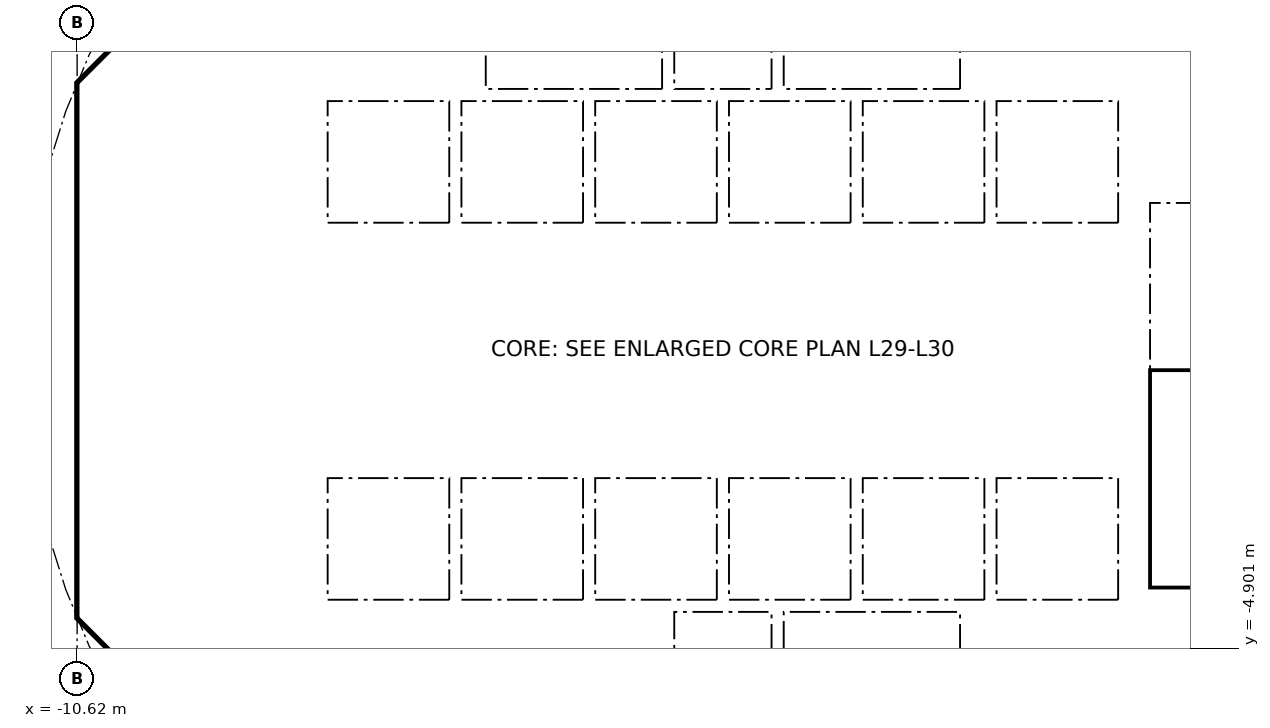
"""IFC4 building model, lengths in metres.
Left out: names, types, materials, properties, quantities, classifications, styles, units other than length and angle.
Written with IfcOpenShell. Run it as: python <this file> out.ifc"""

import sys

from ifc_helpers import new_model, si_unit, direction, frame, frame_2d, origin, place, context, subcontext, project, spatial, polyline, rectangle, outline, extrude, element, fill, save


model = new_model("IFC4")
c1 = context("Model", 3, precision=1e-05, world=origin(), true_north=direction((0.0, 1.0)))
c2 = subcontext(c1, "Body", "Model", "MODEL_VIEW")
j1 = project(units=[si_unit("LENGTHUNIT", "METRE"), si_unit("PLANEANGLEUNIT", "RADIAN")], contexts=[c1])
p1 = place(None, origin())
s1 = spatial("IfcSite", under=j1, at=p1, CompositionType="ELEMENT")
p2 = place(p1, origin())
s2 = spatial("IfcBuilding", under=s1, at=p2, CompositionType="ELEMENT")
p3 = place(p2, frame((0.0, 0.0, 123.3)))
s3 = spatial("IfcBuildingStorey", under=s2, at=p3, CompositionType="ELEMENT", Elevation=123.3)
p4 = place(p3, frame((9.988, 4.613, 0.0), z_axis=(0.0, 0.0, 1.0), x_axis=(-0.707106781187, 0.707106781187, 0.0)))
e1 = element("IfcWall", 1, at=p4, inside=s3, PredefinedType="SHEAR", context=c2, shape_type="SweptSolid", body=[
    extrude(rectangle(XDim=7.602, YDim=0.6, at=frame_2d((3.801, 0.0))), origin(), (0.0, 0.0, 1.0), 3.44),
])
p5 = place(p4, frame((3.201, 0.0, 0.0)))
e2 = element("IfcOpeningElement", 2, at=p5, cuts=e1, PredefinedType="OPENING", context=c2, shape_type="SweptSolid", body=[
    extrude(rectangle(XDim=1.2, YDim=2.1, at=frame_2d((0.6, 1.05))), frame((0.0, 0.31, 0.0), z_axis=(0.0, -1.0, 0.0), x_axis=(1.0, 0.0, 0.0)), (0.0, 0.0, 1.0), 0.62),
])
p6 = place(p3, frame((-4.613, 9.988, 0.0), z_axis=(0.0, 0.0, 1.0), x_axis=(-0.707106781187, -0.707106781187, 0.0)))
e3 = element("IfcWall", 3, at=p6, inside=s3, PredefinedType="SHEAR", context=c2, shape_type="SweptSolid", body=[
    extrude(rectangle(XDim=7.602, YDim=0.6, at=frame_2d((3.801, 0.0))), origin(), (0.0, 0.0, 1.0), 3.44),
])
p7 = place(p6, frame((0.351, 0.0, 0.0)))
e4 = element("IfcOpeningElement", 4, at=p7, cuts=e3, PredefinedType="OPENING", context=c2, shape_type="SweptSolid", body=[
    extrude(rectangle(XDim=1.1, YDim=2.1, at=frame_2d((0.55, 1.05))), frame((0.0, 0.31, 0.0), z_axis=(0.0, -1.0, 0.0), x_axis=(1.0, 0.0, 0.0)), (0.0, 0.0, 1.0), 0.62),
])
p8 = place(p3, frame((-10.325, 3.801, 0.0), z_axis=(0.0, 0.0, 1.0), x_axis=(0.0, -1.0, 0.0)))
e5 = element("IfcWall", 5, at=p8, inside=s3, PredefinedType="SHEAR", context=c2, shape_type="SweptSolid", body=[
    extrude(rectangle(XDim=7.602, YDim=0.6, at=frame_2d((3.801, 0.0))), origin(), (0.0, 0.0, 1.0), 3.44),
])
p9 = place(p8, frame((0.651, 0.0, 0.0)))
e6 = element("IfcOpeningElement", 6, at=p9, cuts=e5, PredefinedType="OPENING", context=c2, shape_type="SweptSolid", body=[
    extrude(rectangle(XDim=1.5, YDim=2.1, at=frame_2d((0.75, 1.05))), frame((0.0, 0.31, 0.0), z_axis=(0.0, -1.0, 0.0), x_axis=(1.0, 0.0, 0.0)), (0.0, 0.0, 1.0), 0.62),
])
p10 = place(p8, frame((5.451, 0.0, 0.0)))
e7 = element("IfcOpeningElement", 7, at=p10, cuts=e5, PredefinedType="OPENING", context=c2, shape_type="SweptSolid", body=[
    extrude(rectangle(XDim=1.5, YDim=2.1, at=frame_2d((0.75, 1.05))), frame((0.0, 0.31, 0.0), z_axis=(0.0, -1.0, 0.0), x_axis=(1.0, 0.0, 0.0)), (0.0, 0.0, 1.0), 0.62),
])
p11 = place(p3, frame((-9.988, -4.613, 0.0), z_axis=(0.0, 0.0, 1.0), x_axis=(0.707106781187, -0.707106781187, 0.0)))
e8 = element("IfcWall", 8, at=p11, inside=s3, PredefinedType="SHEAR", context=c2, shape_type="SweptSolid", body=[
    extrude(rectangle(XDim=7.602, YDim=0.6, at=frame_2d((3.801, 0.0))), origin(), (0.0, 0.0, 1.0), 3.44),
])
p12 = place(p11, frame((6.151, 0.0, 0.0)))
e9 = element("IfcOpeningElement", 9, at=p12, cuts=e8, PredefinedType="OPENING", context=c2, shape_type="SweptSolid", body=[
    extrude(rectangle(XDim=1.1, YDim=2.1, at=frame_2d((0.55, 1.05))), frame((0.0, 0.31, 0.0), z_axis=(0.0, -1.0, 0.0), x_axis=(1.0, 0.0, 0.0)), (0.0, 0.0, 1.0), 0.62),
])
p13 = place(p3, frame((4.613, -9.988, 0.0), z_axis=(0.0, 0.0, 1.0), x_axis=(0.707106781187, 0.707106781187, 0.0)))
e10 = element("IfcWall", 10, at=p13, inside=s3, PredefinedType="SHEAR", context=c2, shape_type="SweptSolid", body=[
    extrude(rectangle(XDim=7.602, YDim=0.6, at=frame_2d((3.801, 0.0))), origin(), (0.0, 0.0, 1.0), 3.44),
])
p14 = place(p13, frame((3.201, 0.0, 0.0)))
e11 = element("IfcOpeningElement", 11, at=p14, cuts=e10, PredefinedType="OPENING", context=c2, shape_type="SweptSolid", body=[
    extrude(rectangle(XDim=1.2, YDim=2.1, at=frame_2d((0.6, 1.05))), frame((0.0, 0.31, 0.0), z_axis=(0.0, -1.0, 0.0), x_axis=(1.0, 0.0, 0.0)), (0.0, 0.0, 1.0), 0.62),
])
p15 = place(p3, frame((-5.8, 4.3, 0.0), z_axis=(0.0, 0.0, 1.0), x_axis=(0.0, 1.0, 0.0)))
e12 = element("IfcWall", 12, at=p15, inside=s3, PredefinedType="PARTITIONING", context=c2, shape_type="SweptSolid", body=[
    extrude(rectangle(XDim=3.927, YDim=0.15, at=frame_2d((1.963, 0.0))), origin(), (0.0, 0.0, 1.0), 3.44),
])
p16 = place(p15, frame((1.551, 0.0, 0.0)))
e13 = element("IfcOpeningElement", 13, at=p16, cuts=e12, PredefinedType="OPENING", context=c2, shape_type="SweptSolid", body=[
    extrude(rectangle(XDim=0.9, YDim=2.1, at=frame_2d((0.45, 1.05))), frame((0.0, 0.085, 0.0), z_axis=(0.0, -1.0, 0.0), x_axis=(1.0, 0.0, 0.0)), (0.0, 0.0, 1.0), 0.17),
])
p17 = place(p3, frame((4.0, 4.3, 0.0), z_axis=(0.0, 0.0, 1.0), x_axis=(0.0, 1.0, 0.0)))
e14 = element("IfcWall", 14, at=p17, inside=s3, PredefinedType="SOLIDWALL", context=c2, shape_type="SweptSolid", body=[
    extrude(rectangle(XDim=2.2, YDim=0.2, at=frame_2d((1.1, 0.0))), origin(), (0.0, 0.0, 1.0), 3.44),
])
p18 = place(p17, frame((0.55, 0.0, 0.0)))
e15 = element("IfcOpeningElement", 15, at=p18, cuts=e14, PredefinedType="OPENING", context=c2, shape_type="SweptSolid", body=[
    extrude(rectangle(XDim=1.1, YDim=2.1, at=frame_2d((0.55, 1.05))), frame((0.0, 0.11, 0.0), z_axis=(0.0, -1.0, 0.0), x_axis=(1.0, 0.0, 0.0)), (0.0, 0.0, 1.0), 0.22),
])
p19 = place(p3, frame((-4.0, 4.3, 0.0), z_axis=(0.0, 0.0, 1.0), x_axis=(0.0, 1.0, 0.0)))
e16 = element("IfcWall", 16, at=p19, inside=s3, PredefinedType="SOLIDWALL", context=c2, shape_type="SweptSolid", body=[
    extrude(rectangle(XDim=2.2, YDim=0.2, at=frame_2d((1.1, 0.0))), origin(), (0.0, 0.0, 1.0), 3.44),
])
p20 = place(p19, frame((0.55, 0.0, 0.0)))
e17 = element("IfcOpeningElement", 17, at=p20, cuts=e16, PredefinedType="OPENING", context=c2, shape_type="SweptSolid", body=[
    extrude(rectangle(XDim=1.1, YDim=2.1, at=frame_2d((0.55, 1.05))), frame((0.0, 0.11, 0.0), z_axis=(0.0, -1.0, 0.0), x_axis=(1.0, 0.0, 0.0)), (0.0, 0.0, 1.0), 0.22),
])
p21 = place(p3, frame((-6.7, 2.0, 0.0), z_axis=(0.0, 0.0, 1.0), x_axis=(1.0, 0.0, 0.0)))
e18 = element("IfcWall", 18, at=p21, inside=s3, PredefinedType="SOLIDWALL", context=c2, shape_type="SweptSolid", body=[
    extrude(rectangle(XDim=13.4, YDim=0.2, at=frame_2d((6.7, 0.0))), origin(), (0.0, 0.0, 1.0), 3.44),
])
p22 = place(p21, frame((0.65, 0.0, 0.0)))
e19 = element("IfcOpeningElement", 19, at=p22, cuts=e18, PredefinedType="OPENING", context=c2, shape_type="SweptSolid", body=[
    extrude(rectangle(XDim=1.1, YDim=2.1, at=frame_2d((0.55, 1.05))), frame((0.0, 0.11, 0.0), z_axis=(0.0, -1.0, 0.0), x_axis=(1.0, 0.0, 0.0)), (0.0, 0.0, 1.0), 0.22),
])
p23 = place(p21, frame((2.85, 0.0, 0.0)))
e20 = element("IfcOpeningElement", 20, at=p23, cuts=e18, PredefinedType="OPENING", context=c2, shape_type="SweptSolid", body=[
    extrude(rectangle(XDim=1.1, YDim=2.1, at=frame_2d((0.55, 1.05))), frame((0.0, 0.11, 0.0), z_axis=(0.0, -1.0, 0.0), x_axis=(1.0, 0.0, 0.0)), (0.0, 0.0, 1.0), 0.22),
])
p24 = place(p21, frame((5.05, 0.0, 0.0)))
e21 = element("IfcOpeningElement", 21, at=p24, cuts=e18, PredefinedType="OPENING", context=c2, shape_type="SweptSolid", body=[
    extrude(rectangle(XDim=1.1, YDim=2.1, at=frame_2d((0.55, 1.05))), frame((0.0, 0.11, 0.0), z_axis=(0.0, -1.0, 0.0), x_axis=(1.0, 0.0, 0.0)), (0.0, 0.0, 1.0), 0.22),
])
p25 = place(p3, frame((6.7, 4.0, 0.0), z_axis=(0.0, 0.0, 1.0), x_axis=(1.0, 0.0, 0.0)))
e22 = element("IfcWall", 22, at=p25, inside=s3, PredefinedType="SOLIDWALL", context=c2, shape_type="SweptSolid", body=[
    extrude(rectangle(XDim=3.325, YDim=0.2, at=frame_2d((1.662, 0.0))), origin(), (0.0, 0.0, 1.0), 3.44),
])
p26 = place(p25, frame((1.25, 0.0, 0.0)))
e23 = element("IfcOpeningElement", 23, at=p26, cuts=e22, PredefinedType="OPENING", context=c2, shape_type="SweptSolid", body=[
    extrude(rectangle(XDim=1.1, YDim=2.1, at=frame_2d((0.55, 1.05))), frame((0.0, 0.11, 0.0), z_axis=(0.0, -1.0, 0.0), x_axis=(1.0, 0.0, 0.0)), (0.0, 0.0, 1.0), 0.22),
])
p27 = place(p3, frame((-5.8, -8.227, 0.0), z_axis=(0.0, 0.0, 1.0), x_axis=(0.0, 1.0, 0.0)))
e24 = element("IfcWall", 24, at=p27, inside=s3, PredefinedType="PARTITIONING", context=c2, shape_type="SweptSolid", body=[
    extrude(rectangle(XDim=3.927, YDim=0.15, at=frame_2d((1.963, 0.0))), origin(), (0.0, 0.0, 1.0), 3.44),
])
p28 = place(p27, frame((1.476, 0.0, 0.0)))
e25 = element("IfcOpeningElement", 25, at=p28, cuts=e24, PredefinedType="OPENING", context=c2, shape_type="SweptSolid", body=[
    extrude(rectangle(XDim=0.9, YDim=2.1, at=frame_2d((0.45, 1.05))), frame((0.0, 0.085, 0.0), z_axis=(0.0, -1.0, 0.0), x_axis=(1.0, 0.0, 0.0)), (0.0, 0.0, 1.0), 0.17),
])
p29 = place(p3, frame((4.0, -6.5, 0.0), z_axis=(0.0, 0.0, 1.0), x_axis=(0.0, 1.0, 0.0)))
e26 = element("IfcWall", 26, at=p29, inside=s3, PredefinedType="SOLIDWALL", context=c2, shape_type="SweptSolid", body=[
    extrude(rectangle(XDim=2.2, YDim=0.2, at=frame_2d((1.1, 0.0))), origin(), (0.0, 0.0, 1.0), 3.44),
])
p30 = place(p29, frame((0.55, 0.0, 0.0)))
e27 = element("IfcOpeningElement", 27, at=p30, cuts=e26, PredefinedType="OPENING", context=c2, shape_type="SweptSolid", body=[
    extrude(rectangle(XDim=1.1, YDim=2.1, at=frame_2d((0.55, 1.05))), frame((0.0, 0.11, 0.0), z_axis=(0.0, -1.0, 0.0), x_axis=(1.0, 0.0, 0.0)), (0.0, 0.0, 1.0), 0.22),
])
p31 = place(p3, frame((-4.0, -6.5, 0.0), z_axis=(0.0, 0.0, 1.0), x_axis=(0.0, 1.0, 0.0)))
e28 = element("IfcWall", 28, at=p31, inside=s3, PredefinedType="SOLIDWALL", context=c2, shape_type="SweptSolid", body=[
    extrude(rectangle(XDim=2.2, YDim=0.2, at=frame_2d((1.1, 0.0))), origin(), (0.0, 0.0, 1.0), 3.44),
])
p32 = place(p31, frame((0.65, 0.0, 0.0)))
e29 = element("IfcOpeningElement", 29, at=p32, cuts=e28, PredefinedType="OPENING", context=c2, shape_type="SweptSolid", body=[
    extrude(rectangle(XDim=0.9, YDim=2.1, at=frame_2d((0.45, 1.05))), frame((0.0, 0.11, 0.0), z_axis=(0.0, -1.0, 0.0), x_axis=(1.0, 0.0, 0.0)), (0.0, 0.0, 1.0), 0.22),
])
p33 = place(p3, frame((-6.7, -2.0, 0.0), z_axis=(0.0, 0.0, 1.0), x_axis=(1.0, 0.0, 0.0)))
e30 = element("IfcWall", 30, at=p33, inside=s3, PredefinedType="SOLIDWALL", context=c2, shape_type="SweptSolid", body=[
    extrude(rectangle(XDim=13.4, YDim=0.2, at=frame_2d((6.7, 0.0))), origin(), (0.0, 0.0, 1.0), 3.44),
])
p34 = place(p33, frame((0.65, 0.0, 0.0)))
e31 = element("IfcOpeningElement", 31, at=p34, cuts=e30, PredefinedType="OPENING", context=c2, shape_type="SweptSolid", body=[
    extrude(rectangle(XDim=1.1, YDim=2.1, at=frame_2d((0.55, 1.05))), frame((0.0, 0.11, 0.0), z_axis=(0.0, -1.0, 0.0), x_axis=(1.0, 0.0, 0.0)), (0.0, 0.0, 1.0), 0.22),
])
p35 = place(p33, frame((2.85, 0.0, 0.0)))
e32 = element("IfcOpeningElement", 32, at=p35, cuts=e30, PredefinedType="OPENING", context=c2, shape_type="SweptSolid", body=[
    extrude(rectangle(XDim=1.1, YDim=2.1, at=frame_2d((0.55, 1.05))), frame((0.0, 0.11, 0.0), z_axis=(0.0, -1.0, 0.0), x_axis=(1.0, 0.0, 0.0)), (0.0, 0.0, 1.0), 0.22),
])
p36 = place(p3, origin())
e33 = element("IfcWall", 33, at=p36, inside=s3, PredefinedType="SHEAR", context=c2, shape_type="SweptSolid", body=[
    extrude(outline(polyline([(-10.625, -3.801), (-10.025, -3.801), (-10.025, -4.152), (-9.776, -4.401), (-10.2, -4.825), (-10.625, -4.401), (-10.625, -3.801)])), origin(), (0.0, 0.0, 1.0), 3.44),
])
p37 = place(p3, origin())
e34 = element("IfcWall", 34, at=p37, inside=s3, PredefinedType="SHEAR", context=c2, shape_type="SweptSolid", body=[
    extrude(outline(polyline([(-10.2, 4.825), (-9.776, 4.401), (-10.025, 4.152), (-10.025, 3.801), (-10.625, 3.801), (-10.625, 4.401), (-10.2, 4.825)])), origin(), (0.0, 0.0, 1.0), 3.44),
])
for number, where, z_axis, x_axis in (
    (35, (-0.9, -6.5, 0.0), (0.0, 0.0, 1.0), (0.0, 1.0, 0.0)),
    (36, (0.9, -6.5, 0.0), (0.0, 0.0, 1.0), (0.0, 1.0, 0.0)),
):
    element("IfcWall", number, at=place(p3, frame(where, z_axis=z_axis, x_axis=x_axis)), inside=s3, PredefinedType="SOLIDWALL", context=c2, shape_type="SweptSolid", body=[
        extrude(rectangle(XDim=2.2, YDim=0.2, at=frame_2d((1.1, 0.0))), origin(), (0.0, 0.0, 1.0), 3.44),
    ])
p38 = place(p3, origin())
e37 = element("IfcWall", 37, at=p38, inside=s3, PredefinedType="SOLIDWALL", context=c2, shape_type="SweptSolid", body=[
    extrude(outline(polyline([(-6.7, -2.1), (-6.5, -2.1), (-6.5, -4.1), (-4.5, -4.1), (-4.5, -2.1), (-4.3, -2.1), (-4.3, -4.1), (-2.3, -4.1), (-2.3, -2.1), (-2.1, -2.1), (-2.1, -4.1), (-0.1, -4.1), (-0.1, -2.1), (0.1, -2.1), (0.1, -4.1), (2.1, -4.1), (2.1, -2.1), (2.3, -2.1), (2.3, -4.1), (4.3, -4.1), (4.3, -2.1), (4.5, -2.1), (4.5, -4.1), (6.5, -4.1), (6.5, -2.1), (6.7, -2.1), (6.7, -4.3), (-6.7, -4.3), (-6.7, -2.1)])), origin(), (0.0, 0.0, 1.0), 3.44),
])
for number, where, z_axis, x_axis in (
    (38, (-0.9, 4.3, 0.0), (0.0, 0.0, 1.0), (0.0, 1.0, 0.0)),
    (39, (0.9, 4.3, 0.0), (0.0, 0.0, 1.0), (0.0, 1.0, 0.0)),
):
    element("IfcWall", number, at=place(p3, frame(where, z_axis=z_axis, x_axis=x_axis)), inside=s3, PredefinedType="SOLIDWALL", context=c2, shape_type="SweptSolid", body=[
        extrude(rectangle(XDim=2.2, YDim=0.2, at=frame_2d((1.1, 0.0))), origin(), (0.0, 0.0, 1.0), 3.44),
    ])
p39 = place(p3, origin())
e40 = element("IfcWall", 40, at=p39, inside=s3, PredefinedType="SOLIDWALL", context=c2, shape_type="SweptSolid", body=[
    extrude(outline(polyline([(-6.5, 2.1), (-6.7, 2.1), (-6.7, 4.3), (6.7, 4.3), (6.7, 2.1), (6.5, 2.1), (6.5, 4.1), (4.5, 4.1), (4.5, 2.1), (4.3, 2.1), (4.3, 4.1), (2.3, 4.1), (2.3, 2.1), (2.1, 2.1), (2.1, 4.1), (0.1, 4.1), (0.1, 2.1), (-0.1, 2.1), (-0.1, 4.1), (-2.1, 4.1), (-2.1, 2.1), (-2.3, 2.1), (-2.3, 4.1), (-4.3, 4.1), (-4.3, 2.1), (-4.5, 2.1), (-4.5, 4.1), (-6.5, 4.1), (-6.5, 2.1)])), origin(), (0.0, 0.0, 1.0), 3.44),
])
for number, where, z_axis, x_axis in (
    (41, (-10.025, -4.0, 0.0), (0.0, 0.0, 1.0), (1.0, 0.0, 0.0)),
    (42, (-10.025, 4.0, 0.0), (0.0, 0.0, 1.0), (1.0, 0.0, 0.0)),
):
    element("IfcWall", number, at=place(p3, frame(where, z_axis=z_axis, x_axis=x_axis)), inside=s3, PredefinedType="PARTITIONING", context=c2, shape_type="SweptSolid", body=[
        extrude(rectangle(XDim=3.325, YDim=0.2, at=frame_2d((1.662, 0.0))), origin(), (0.0, 0.0, 1.0), 3.44),
    ])
p40 = place(p3, origin())
e43 = element("IfcWall", 43, at=p40, inside=s3, PredefinedType="SOLIDWALL", context=c2, shape_type="SweptSolid", body=[
    extrude(outline(polyline([(7.025, -3.9), (6.7, -3.9), (6.7, 3.9), (7.025, 3.9), (7.025, -3.9)])), origin(), (0.0, 0.0, 1.0), 3.44),
])
p41 = place(p3, origin())
e44 = element("IfcWall", 44, at=p41, inside=s3, PredefinedType="SOLIDWALL", context=c2, shape_type="SweptSolid", body=[
    extrude(outline(polyline([(10.025, -4.1), (6.7, -4.1), (6.7, -3.9), (10.025, -3.9), (10.025, -4.1)])), origin(), (0.0, 0.0, 1.0), 3.44),
])
p42 = place(p22, origin())
e45 = element("IfcDoor", 45, at=p42, inside=s3, OperationType="DOUBLE_DOOR_SLIDING", PredefinedType="DOOR", context=c2, shape_type="SweptSolid", body=[
    extrude(rectangle(XDim=1.1, YDim=2.1, at=frame_2d((0.55, 1.05))), frame((0.0, 0.025, 0.0), z_axis=(0.0, -1.0, 0.0), x_axis=(1.0, 0.0, 0.0)), (0.0, 0.0, 1.0), 0.05),
])
fill(e19, e45)
p43 = place(p23, origin())
e46 = element("IfcDoor", 46, at=p43, inside=s3, OperationType="DOUBLE_DOOR_SLIDING", PredefinedType="DOOR", context=c2, shape_type="SweptSolid", body=[
    extrude(rectangle(XDim=1.1, YDim=2.1, at=frame_2d((0.55, 1.05))), frame((0.0, 0.025, 0.0), z_axis=(0.0, -1.0, 0.0), x_axis=(1.0, 0.0, 0.0)), (0.0, 0.0, 1.0), 0.05),
])
fill(e20, e46)
p44 = place(p24, origin())
e47 = element("IfcDoor", 47, at=p44, inside=s3, OperationType="DOUBLE_DOOR_SLIDING", PredefinedType="DOOR", context=c2, shape_type="SweptSolid", body=[
    extrude(rectangle(XDim=1.1, YDim=2.1, at=frame_2d((0.55, 1.05))), frame((0.0, 0.025, 0.0), z_axis=(0.0, -1.0, 0.0), x_axis=(1.0, 0.0, 0.0)), (0.0, 0.0, 1.0), 0.05),
])
fill(e21, e47)
p45 = place(p34, origin())
e48 = element("IfcDoor", 48, at=p45, inside=s3, OperationType="DOUBLE_DOOR_SLIDING", PredefinedType="DOOR", context=c2, shape_type="SweptSolid", body=[
    extrude(rectangle(XDim=1.1, YDim=2.1, at=frame_2d((0.55, 1.05))), frame((0.0, 0.025, 0.0), z_axis=(0.0, -1.0, 0.0), x_axis=(1.0, 0.0, 0.0)), (0.0, 0.0, 1.0), 0.05),
])
fill(e31, e48)
p46 = place(p35, origin())
e49 = element("IfcDoor", 49, at=p46, inside=s3, OperationType="DOUBLE_DOOR_SLIDING", PredefinedType="DOOR", context=c2, shape_type="SweptSolid", body=[
    extrude(rectangle(XDim=1.1, YDim=2.1, at=frame_2d((0.55, 1.05))), frame((0.0, 0.025, 0.0), z_axis=(0.0, -1.0, 0.0), x_axis=(1.0, 0.0, 0.0)), (0.0, 0.0, 1.0), 0.05),
])
fill(e32, e49)
p47 = place(p18, origin())
e50 = element("IfcDoor", 50, at=p47, inside=s3, OperationType="DOUBLE_DOOR_SLIDING", PredefinedType="DOOR", context=c2, shape_type="SweptSolid", body=[
    extrude(rectangle(XDim=1.1, YDim=2.1, at=frame_2d((0.55, 1.05))), frame((0.0, 0.025, 0.0), z_axis=(0.0, -1.0, 0.0), x_axis=(1.0, 0.0, 0.0)), (0.0, 0.0, 1.0), 0.05),
])
fill(e15, e50)
p48 = place(p30, origin())
e51 = element("IfcDoor", 51, at=p48, inside=s3, OperationType="DOUBLE_DOOR_SLIDING", PredefinedType="DOOR", context=c2, shape_type="SweptSolid", body=[
    extrude(rectangle(XDim=1.1, YDim=2.1, at=frame_2d((0.55, 1.05))), frame((0.0, 0.025, 0.0), z_axis=(0.0, -1.0, 0.0), x_axis=(1.0, 0.0, 0.0)), (0.0, 0.0, 1.0), 0.05),
])
fill(e27, e51)
p49 = place(p20, origin())
e52 = element("IfcDoor", 52, at=p49, inside=s3, OperationType="DOUBLE_DOOR_SLIDING", PredefinedType="DOOR", context=c2, shape_type="SweptSolid", body=[
    extrude(rectangle(XDim=1.1, YDim=2.1, at=frame_2d((0.55, 1.05))), frame((0.0, 0.025, 0.0), z_axis=(0.0, -1.0, 0.0), x_axis=(1.0, 0.0, 0.0)), (0.0, 0.0, 1.0), 0.05),
])
fill(e17, e52)
p50 = place(p9, origin())
e53 = element("IfcDoor", 53, at=p50, inside=s3, OperationType="DOUBLE_DOOR_SINGLE_SWING", PredefinedType="DOOR", context=c2, shape_type="SweptSolid", body=[
    extrude(rectangle(XDim=1.5, YDim=2.1, at=frame_2d((0.75, 1.05))), frame((0.0, 0.025, 0.0), z_axis=(0.0, -1.0, 0.0), x_axis=(1.0, 0.0, 0.0)), (0.0, 0.0, 1.0), 0.05),
])
fill(e6, e53)
p51 = place(p10, origin())
e54 = element("IfcDoor", 54, at=p51, inside=s3, OperationType="DOUBLE_DOOR_SINGLE_SWING", PredefinedType="DOOR", context=c2, shape_type="SweptSolid", body=[
    extrude(rectangle(XDim=1.5, YDim=2.1, at=frame_2d((0.75, 1.05))), frame((0.0, 0.025, 0.0), z_axis=(0.0, -1.0, 0.0), x_axis=(1.0, 0.0, 0.0)), (0.0, 0.0, 1.0), 0.05),
])
fill(e7, e54)
save(model, sys.argv[1])
